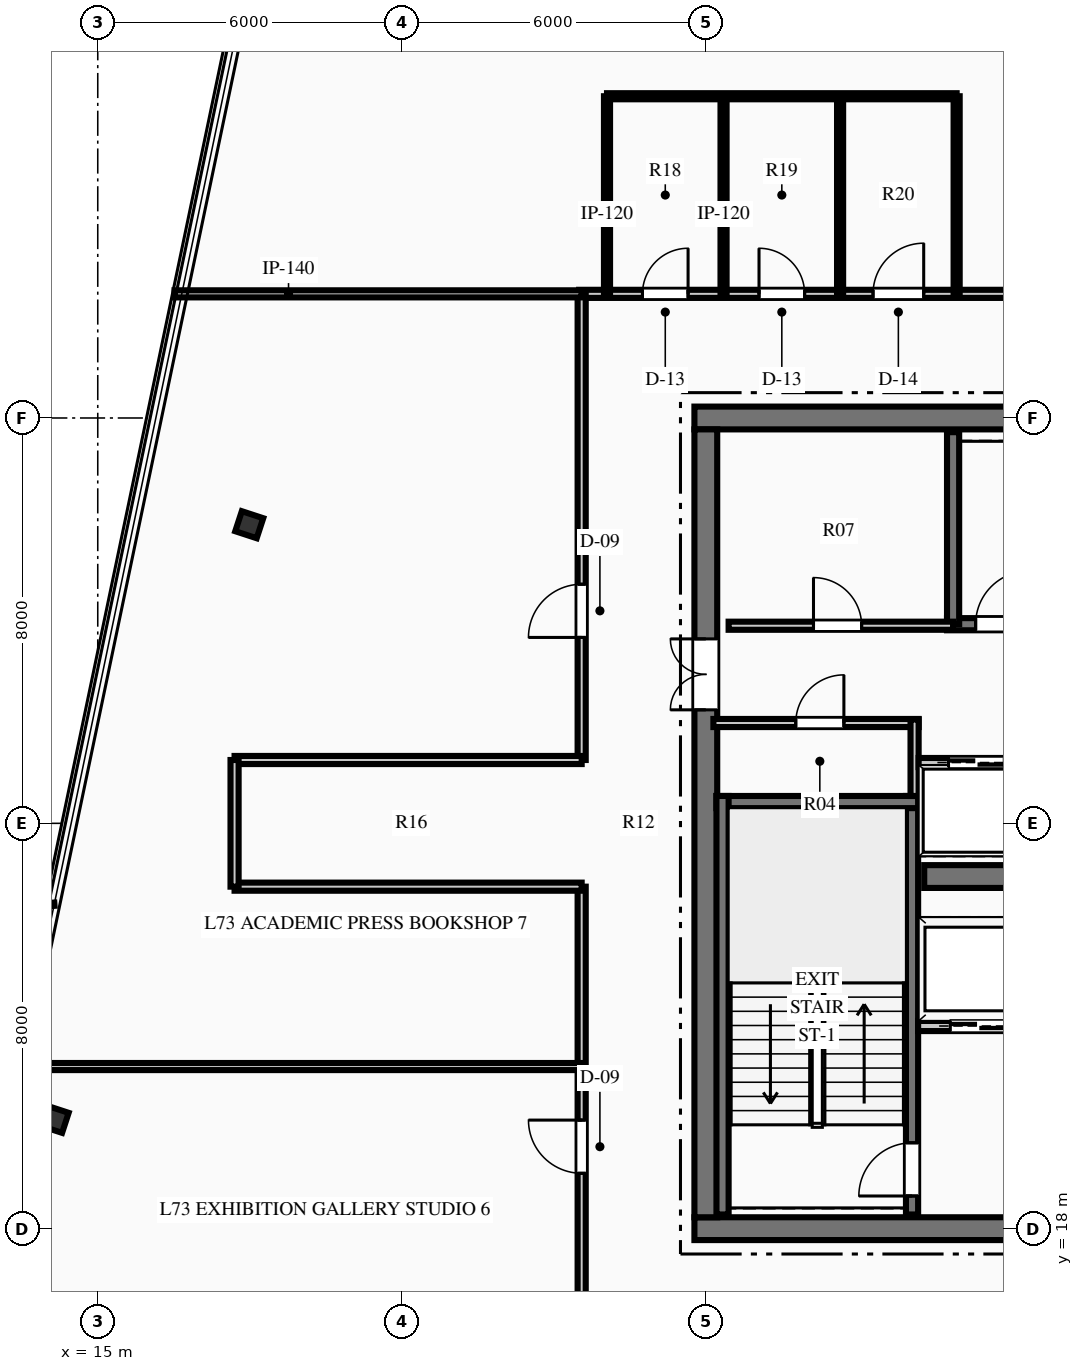
"""IFC4 building model, lengths in metres.
Left out: names, types, materials, properties, quantities, classifications, styles, units other than length and angle.
Written with IfcOpenShell. Run it as: python <this file> out.ifc"""

import sys

from ifc_helpers import new_model, si_unit, direction, frame, frame_2d, origin, origin_2d, place, context, subcontext, project, spatial, rectangle, i_section, extrude, element, fill, save


model = new_model("IFC4")
c1 = context("Model", 3, precision=1e-05, world=origin(), true_north=direction((0.0, 1.0)))
c2 = subcontext(c1, "Body", "Model", "MODEL_VIEW")
j1 = project(units=[si_unit("LENGTHUNIT", "METRE"), si_unit("PLANEANGLEUNIT", "RADIAN")], contexts=[c1])
p1 = place(None, origin())
s1 = spatial("IfcSite", under=j1, at=p1, CompositionType="ELEMENT")
p2 = place(p1, origin())
s2 = spatial("IfcBuilding", under=s1, at=p2, CompositionType="ELEMENT")
p3 = place(p2, frame((0.0, 0.0, 289.95)))
s3 = spatial("IfcBuildingStorey", under=s2, at=p3, CompositionType="ELEMENT", Elevation=289.95)
p4 = place(p3, frame((26.775, 18.0, 0.0), z_axis=(0.0, 0.0, 1.0), x_axis=(1.0, 0.0, 0.0)))
e1 = element("IfcWall", 1, at=p4, inside=s3, PredefinedType="SHEAR", context=c2, shape_type="SweptSolid", body=[
    extrude(rectangle(XDim=18.45, YDim=0.45, at=frame_2d((9.225, 0.0))), origin(), (0.0, 0.0, 1.0), 3.75),
])
p5 = place(p4, frame((7.325, 0.0, 0.0)))
e2 = element("IfcOpeningElement", 2, at=p5, cuts=e1, PredefinedType="OPENING", context=c2, shape_type="SweptSolid", body=[
    extrude(rectangle(XDim=1.1, YDim=2.15, at=frame_2d((0.55, 1.075))), frame((0.0, 0.235, 0.0), z_axis=(0.0, -1.0, 0.0), x_axis=(1.0, 0.0, 0.0)), (0.0, 0.0, 1.0), 0.47),
])
p6 = place(p4, frame((10.025, 0.0, 0.0)))
e3 = element("IfcOpeningElement", 3, at=p6, cuts=e1, PredefinedType="OPENING", context=c2, shape_type="SweptSolid", body=[
    extrude(rectangle(XDim=1.1, YDim=2.15, at=frame_2d((0.55, 1.075))), frame((0.0, 0.235, 0.0), z_axis=(0.0, -1.0, 0.0), x_axis=(1.0, 0.0, 0.0)), (0.0, 0.0, 1.0), 0.47),
])
p7 = place(p3, frame((26.775, 34.0, 0.0), z_axis=(0.0, 0.0, 1.0), x_axis=(1.0, 0.0, 0.0)))
e4 = element("IfcWall", 4, at=p7, inside=s3, PredefinedType="SHEAR", context=c2, shape_type="SweptSolid", body=[
    extrude(rectangle(XDim=18.45, YDim=0.45, at=frame_2d((9.225, 0.0))), origin(), (0.0, 0.0, 1.0), 3.75),
])
p8 = place(p3, frame((27.0, 18.225, 0.0), z_axis=(0.0, 0.0, 1.0), x_axis=(0.0, 1.0, 0.0)))
e5 = element("IfcWall", 5, at=p8, inside=s3, PredefinedType="SHEAR", context=c2, shape_type="SweptSolid", body=[
    extrude(rectangle(XDim=15.55, YDim=0.45, at=frame_2d((7.775, 0.0))), origin(), (0.0, 0.0, 1.0), 3.75),
])
p9 = place(p8, frame((10.015, 0.0, 0.0)))
e6 = element("IfcOpeningElement", 6, at=p9, cuts=e5, PredefinedType="OPENING", context=c2, shape_type="SweptSolid", body=[
    extrude(rectangle(XDim=1.4, YDim=2.2, at=frame_2d((0.7, 1.1))), frame((0.0, 0.235, 0.0), z_axis=(0.0, -1.0, 0.0), x_axis=(1.0, 0.0, 0.0)), (0.0, 0.0, 1.0), 0.47),
])
p10 = place(p3, frame((31.31, 24.95, 0.0), z_axis=(0.0, 0.0, 1.0), x_axis=(1.0, 0.0, 0.0)))
e7 = element("IfcWall", 7, at=p10, inside=s3, PredefinedType="SHEAR", context=c2, shape_type="SweptSolid", body=[
    extrude(rectangle(XDim=9.38, YDim=0.45, at=frame_2d((4.69, 0.0))), origin(), (0.0, 0.0, 1.0), 3.75),
])
p11 = place(p3, frame((31.07, 18.28, 0.0), z_axis=(0.0, 0.0, 1.0), x_axis=(0.0, 1.0, 0.0)))
e8 = element("IfcWall", 8, at=p11, inside=s3, PredefinedType="SHEAR", context=c2, shape_type="SweptSolid", body=[
    extrude(rectangle(XDim=8.26, YDim=0.24, at=frame_2d((4.13, 0.0))), origin(), (0.0, 0.0, 1.0), 3.75),
])
p12 = place(p11, frame((0.365, 0.0, 0.0)))
e9 = element("IfcOpeningElement", 9, at=p12, cuts=e8, PredefinedType="OPENING", context=c2, shape_type="SweptSolid", body=[
    extrude(rectangle(XDim=1.05, YDim=2.15, at=frame_2d((0.525, 1.075))), frame((0.0, 0.13, 0.0), z_axis=(0.0, -1.0, 0.0), x_axis=(1.0, 0.0, 0.0)), (0.0, 0.0, 1.0), 0.26),
])
p13 = place(p3, frame((27.21, 26.42, 0.0), z_axis=(0.0, 0.0, 1.0), x_axis=(1.0, 0.0, 0.0)))
e10 = element("IfcWall", 10, at=p13, inside=s3, PredefinedType="SHEAR", context=c2, shape_type="SweptSolid", body=[
    extrude(rectangle(XDim=3.98, YDim=0.24, at=frame_2d((1.99, 0.0))), origin(), (0.0, 0.0, 1.0), 3.75),
])
p14 = place(p3, frame((27.33, 18.28, 0.0), z_axis=(0.0, 0.0, 1.0), x_axis=(0.0, 1.0, 0.0)))
e11 = element("IfcWall", 11, at=p14, inside=s3, PredefinedType="SHEAR", context=c2, shape_type="SweptSolid", body=[
    extrude(rectangle(XDim=8.26, YDim=0.24, at=frame_2d((4.13, 0.0))), origin(), (0.0, 0.0, 1.0), 3.75),
])
p15 = place(p3, frame((31.76, 29.93, 0.0), z_axis=(0.0, 0.0, 1.0), x_axis=(1.0, 0.0, 0.0)))
e12 = element("IfcWall", 12, at=p15, inside=s3, PredefinedType="SHEAR", context=c2, shape_type="SweptSolid", body=[
    extrude(rectangle(XDim=8.38, YDim=0.24, at=frame_2d((4.19, 0.0))), origin(), (0.0, 0.0, 1.0), 3.75),
])
p16 = place(p15, frame((0.565, 0.0, 0.0)))
e13 = element("IfcOpeningElement", 13, at=p16, cuts=e12, PredefinedType="OPENING", context=c2, shape_type="SweptSolid", body=[
    extrude(rectangle(XDim=1.05, YDim=2.15, at=frame_2d((0.525, 1.075))), frame((0.0, 0.13, 0.0), z_axis=(0.0, -1.0, 0.0), x_axis=(1.0, 0.0, 0.0)), (0.0, 0.0, 1.0), 0.26),
])
p17 = place(p3, frame((31.88, 29.93, 0.0), z_axis=(0.0, 0.0, 1.0), x_axis=(0.0, 1.0, 0.0)))
e14 = element("IfcWall", 14, at=p17, inside=s3, PredefinedType="SHEAR", context=c2, shape_type="SweptSolid", body=[
    extrude(rectangle(XDim=3.79, YDim=0.24, at=frame_2d((1.895, 0.0))), origin(), (0.0, 0.0, 1.0), 3.75),
])
for number, where, z_axis, x_axis in (
    (15, (17.99, 31.894, 0.0), (0.0, 0.0, 1.0), (0.311, 0.95, 0.0)),
    (16, (14.149, 20.158, 0.0), (0.0, 0.0, 1.0), (0.311, 0.95, 0.0)),
):
    element("IfcColumn", number, at=place(p3, frame(where, z_axis=z_axis, x_axis=x_axis)), inside=s3, PredefinedType="COLUMN", context=c2, shape_type="SweptSolid", body=[
        extrude(i_section(OverallWidth=0.416, OverallDepth=0.445, WebThickness=0.039, FlangeThickness=0.063, at=origin_2d()), origin(), (0.0, 0.0, 1.0), 3.75),
    ])
p18 = place(p3, frame((31.19, 22.0, 0.0), z_axis=(0.0, 0.0, 1.0), x_axis=(1.0, 0.0, 0.0)))
e17 = element("IfcWall", 17, at=p18, inside=s3, PredefinedType="PARTITIONING", context=c2, shape_type="SweptSolid", body=[
    extrude(rectangle(XDim=4.69, YDim=0.2, at=frame_2d((2.345, 0.0))), origin(), (0.0, 0.0, 1.0), 3.34),
])
p19 = place(p18, frame((2.91, 0.0, 0.0)))
e18 = element("IfcOpeningElement", 18, at=p19, cuts=e17, PredefinedType="OPENING", context=c2, shape_type="SweptSolid", body=[
    extrude(rectangle(XDim=0.9, YDim=2.15, at=frame_2d((0.45, 1.075))), frame((0.0, 0.11, 0.0), z_axis=(0.0, -1.0, 0.0), x_axis=(1.0, 0.0, 0.0)), (0.0, 0.0, 1.0), 0.22),
])
p20 = place(p18, frame((0.635, 0.0, 0.0)))
e19 = element("IfcOpeningElement", 19, at=p20, cuts=e17, PredefinedType="OPENING", context=c2, shape_type="SweptSolid", body=[
    extrude(rectangle(XDim=1.1, YDim=2.15, at=frame_2d((0.55, 1.075))), frame((0.0, 0.11, 0.0), z_axis=(0.0, -1.0, 0.0), x_axis=(1.0, 0.0, 0.0)), (0.0, 0.0, 1.0), 0.22),
])
p21 = place(p3, frame((27.15, 27.98, 0.0), z_axis=(0.0, 0.0, 1.0), x_axis=(1.0, 0.0, 0.0)))
e20 = element("IfcWall", 20, at=p21, inside=s3, PredefinedType="PARTITIONING", context=c2, shape_type="SweptSolid", body=[
    extrude(rectangle(XDim=4.05, YDim=0.16, at=frame_2d((2.025, 0.0))), origin(), (0.0, 0.0, 1.0), 3.34),
])
p22 = place(p21, frame((1.625, 0.0, 0.0)))
e21 = element("IfcOpeningElement", 21, at=p22, cuts=e20, PredefinedType="OPENING", context=c2, shape_type="SweptSolid", body=[
    extrude(rectangle(XDim=0.95, YDim=2.15, at=frame_2d((0.475, 1.075))), frame((0.0, 0.09, 0.0), z_axis=(0.0, -1.0, 0.0), x_axis=(1.0, 0.0, 0.0)), (0.0, 0.0, 1.0), 0.18),
])
p23 = place(p3, frame((31.12, 26.54, 0.0), z_axis=(0.0, 0.0, 1.0), x_axis=(0.0, 1.0, 0.0)))
e22 = element("IfcWall", 22, at=p23, inside=s3, PredefinedType="PARTITIONING", context=c2, shape_type="SweptSolid", body=[
    extrude(rectangle(XDim=1.51, YDim=0.16, at=frame_2d((0.755, 0.0))), origin(), (0.0, 0.0, 1.0), 3.34),
])
p24 = place(p3, frame((27.45, 29.9, 0.0), z_axis=(0.0, 0.0, 1.0), x_axis=(1.0, 0.0, 0.0)))
e23 = element("IfcWall", 23, at=p24, inside=s3, PredefinedType="PARTITIONING", context=c2, shape_type="SweptSolid", body=[
    extrude(rectangle(XDim=4.43, YDim=0.16, at=frame_2d((2.215, 0.0))), origin(), (0.0, 0.0, 1.0), 3.34),
])
p25 = place(p24, frame((1.675, 0.0, 0.0)))
e24 = element("IfcOpeningElement", 24, at=p25, cuts=e23, PredefinedType="OPENING", context=c2, shape_type="SweptSolid", body=[
    extrude(rectangle(XDim=0.95, YDim=2.15, at=frame_2d((0.475, 1.075))), frame((0.0, 0.09, 0.0), z_axis=(0.0, -1.0, 0.0), x_axis=(1.0, 0.0, 0.0)), (0.0, 0.0, 1.0), 0.18),
])
p26 = place(p3, frame((31.2, 27.2, 0.0), z_axis=(0.0, 0.0, 1.0), x_axis=(1.0, 0.0, 0.0)))
e25 = element("IfcWall", 25, at=p26, inside=s3, PredefinedType="PARTITIONING", context=c2, shape_type="SweptSolid", body=[
    extrude(rectangle(XDim=9.6, YDim=0.18, at=frame_2d((4.8, 0.0))), origin(), (0.0, 0.0, 1.0), 3.34),
])
p27 = place(p26, frame((0.59, 0.0, 0.0)))
e26 = element("IfcOpeningElement", 26, at=p27, cuts=e25, PredefinedType="OPENING", context=c2, shape_type="SweptSolid", body=[
    extrude(rectangle(XDim=1.1, YDim=2.15, at=frame_2d((0.55, 1.075))), frame((0.0, 0.1, 0.0), z_axis=(0.0, -1.0, 0.0), x_axis=(1.0, 0.0, 0.0)), (0.0, 0.0, 1.0), 0.2),
])
p28 = place(p26, frame((2.99, 0.0, 0.0)))
e27 = element("IfcOpeningElement", 27, at=p28, cuts=e25, PredefinedType="OPENING", context=c2, shape_type="SweptSolid", body=[
    extrude(rectangle(XDim=1.1, YDim=2.15, at=frame_2d((0.55, 1.075))), frame((0.0, 0.1, 0.0), z_axis=(0.0, -1.0, 0.0), x_axis=(1.0, 0.0, 0.0)), (0.0, 0.0, 1.0), 0.2),
])
p29 = place(p26, frame((5.51, 0.0, 0.0)))
e28 = element("IfcOpeningElement", 28, at=p29, cuts=e25, PredefinedType="OPENING", context=c2, shape_type="SweptSolid", body=[
    extrude(rectangle(XDim=1.1, YDim=2.15, at=frame_2d((0.55, 1.075))), frame((0.0, 0.1, 0.0), z_axis=(0.0, -1.0, 0.0), x_axis=(1.0, 0.0, 0.0)), (0.0, 0.0, 1.0), 0.2),
])
p30 = place(p26, frame((7.91, 0.0, 0.0)))
e29 = element("IfcOpeningElement", 29, at=p30, cuts=e25, PredefinedType="OPENING", context=c2, shape_type="SweptSolid", body=[
    extrude(rectangle(XDim=1.1, YDim=2.15, at=frame_2d((0.55, 1.075))), frame((0.0, 0.1, 0.0), z_axis=(0.0, -1.0, 0.0), x_axis=(1.0, 0.0, 0.0)), (0.0, 0.0, 1.0), 0.2),
])
p31 = place(p3, frame((24.5, 36.45, 0.0), z_axis=(0.0, 0.0, 1.0), x_axis=(1.0, 0.0, 0.0)))
e30 = element("IfcWall", 30, at=p31, inside=s3, PredefinedType="PARTITIONING", context=c2, shape_type="SweptSolid", body=[
    extrude(rectangle(XDim=10.25, YDim=0.16, at=frame_2d((5.125, 0.0))), origin(), (0.0, 0.0, 1.0), 3.34),
])
p32 = place(p31, frame((1.25, 0.0, 0.0)))
e31 = element("IfcOpeningElement", 31, at=p32, cuts=e30, PredefinedType="OPENING", context=c2, shape_type="SweptSolid", body=[
    extrude(rectangle(XDim=0.9, YDim=2.15, at=frame_2d((0.45, 1.075))), frame((0.0, 0.09, 0.0), z_axis=(0.0, -1.0, 0.0), x_axis=(1.0, 0.0, 0.0)), (0.0, 0.0, 1.0), 0.18),
])
p33 = place(p31, frame((3.55, 0.0, 0.0)))
e32 = element("IfcOpeningElement", 32, at=p33, cuts=e30, PredefinedType="OPENING", context=c2, shape_type="SweptSolid", body=[
    extrude(rectangle(XDim=0.9, YDim=2.15, at=frame_2d((0.45, 1.075))), frame((0.0, 0.09, 0.0), z_axis=(0.0, -1.0, 0.0), x_axis=(1.0, 0.0, 0.0)), (0.0, 0.0, 1.0), 0.18),
])
p34 = place(p31, frame((5.8, 0.0, 0.0)))
e33 = element("IfcOpeningElement", 33, at=p34, cuts=e30, PredefinedType="OPENING", context=c2, shape_type="SweptSolid", body=[
    extrude(rectangle(XDim=1.0, YDim=2.15, at=frame_2d((0.5, 1.075))), frame((0.0, 0.09, 0.0), z_axis=(0.0, -1.0, 0.0), x_axis=(1.0, 0.0, 0.0)), (0.0, 0.0, 1.0), 0.18),
])
p35 = place(p3, frame((24.55, 15.55, 0.0), z_axis=(0.0, 0.0, 1.0), x_axis=(0.0, 1.0, 0.0)))
e34 = element("IfcWall", 34, at=p35, inside=s3, PredefinedType="PARTITIONING", context=c2, shape_type="SweptSolid", body=[
    extrude(rectangle(XDim=9.2, YDim=0.16, at=frame_2d((4.6, 0.0))), origin(), (0.0, 0.0, 1.0), 3.34),
])
p36 = place(p35, frame((3.543, 0.0, 0.0)))
e35 = element("IfcOpeningElement", 35, at=p36, cuts=e34, PredefinedType="OPENING", context=c2, shape_type="SweptSolid", body=[
    extrude(rectangle(XDim=1.05, YDim=2.15, at=frame_2d((0.525, 1.075))), frame((0.0, 0.09, 0.0), z_axis=(0.0, -1.0, 0.0), x_axis=(1.0, 0.0, 0.0)), (0.0, 0.0, 1.0), 0.18),
])
p37 = place(p3, frame((24.55, 27.25, 0.0), z_axis=(0.0, 0.0, 1.0), x_axis=(0.0, 1.0, 0.0)))
e36 = element("IfcWall", 36, at=p37, inside=s3, PredefinedType="PARTITIONING", context=c2, shape_type="SweptSolid", body=[
    extrude(rectangle(XDim=9.2, YDim=0.16, at=frame_2d((4.6, 0.0))), origin(), (0.0, 0.0, 1.0), 3.34),
])
p38 = place(p37, frame((2.419, 0.0, 0.0)))
e37 = element("IfcOpeningElement", 37, at=p38, cuts=e36, PredefinedType="OPENING", context=c2, shape_type="SweptSolid", body=[
    extrude(rectangle(XDim=1.05, YDim=2.15, at=frame_2d((0.525, 1.075))), frame((0.0, 0.09, 0.0), z_axis=(0.0, -1.0, 0.0), x_axis=(1.0, 0.0, 0.0)), (0.0, 0.0, 1.0), 0.18),
])
for number, where, z_axis, x_axis in (
    (38, (17.7, 24.75, 0.0), (0.0, 0.0, 1.0), (1.0, 0.0, 0.0)),
    (39, (17.7, 27.25, 0.0), (0.0, 0.0, 1.0), (1.0, 0.0, 0.0)),
):
    element("IfcWall", number, at=place(p3, frame(where, z_axis=z_axis, x_axis=x_axis)), inside=s3, PredefinedType="PARTITIONING", context=c2, shape_type="SweptSolid", body=[
        extrude(rectangle(XDim=6.85, YDim=0.16, at=frame_2d((3.425, 0.0))), origin(), (0.0, 0.0, 1.0), 3.34),
    ])
p39 = place(p3, frame((17.7, 24.75, 0.0), z_axis=(0.0, 0.0, 1.0), x_axis=(0.0, 1.0, 0.0)))
e40 = element("IfcWall", 40, at=p39, inside=s3, PredefinedType="PARTITIONING", context=c2, shape_type="SweptSolid", body=[
    extrude(rectangle(XDim=2.5, YDim=0.16, at=frame_2d((1.25, 0.0))), origin(), (0.0, 0.0, 1.0), 3.34),
])
for number, where, z_axis, x_axis in (
    (41, (25.05, 36.45, 0.0), (0.0, 0.0, 1.0), (0.0, 1.0, 0.0)),
    (42, (27.35, 36.45, 0.0), (0.0, 0.0, 1.0), (0.0, 1.0, 0.0)),
    (43, (29.65, 36.45, 0.0), (0.0, 0.0, 1.0), (0.0, 1.0, 0.0)),
):
    element("IfcWall", number, at=place(p3, frame(where, z_axis=z_axis, x_axis=x_axis)), inside=s3, PredefinedType="PARTITIONING", context=c2, shape_type="SweptSolid", body=[
        extrude(rectangle(XDim=3.9, YDim=0.12, at=frame_2d((1.95, 0.0))), origin(), (0.0, 0.0, 1.0), 3.34),
    ])
p40 = place(p3, frame((31.95, 36.45, 0.0), z_axis=(0.0, 0.0, 1.0), x_axis=(0.0, 1.0, 0.0)))
e44 = element("IfcWall", 44, at=p40, inside=s3, PredefinedType="PARTITIONING", context=c2, shape_type="SweptSolid", body=[
    extrude(rectangle(XDim=3.9, YDim=0.12, at=frame_2d((1.95, 0.0))), origin(), (0.0, 0.0, 1.0), 2.718),
])
p41 = place(p3, frame((25.05, 40.35, 0.0), z_axis=(0.0, 0.0, 1.0), x_axis=(1.0, 0.0, 0.0)))
e45 = element("IfcWall", 45, at=p41, inside=s3, PredefinedType="PARTITIONING", context=c2, shape_type="SweptSolid", body=[
    extrude(rectangle(XDim=6.9, YDim=0.12, at=frame_2d((3.45, 0.0))), origin(), (0.0, 0.0, 1.0), 3.34),
])
p42 = place(p3, frame((16.515, 36.45, 0.0), z_axis=(0.0, 0.0, 1.0), x_axis=(1.0, 0.0, 0.0)))
e46 = element("IfcWall", 46, at=p42, inside=s3, PredefinedType="PARTITIONING", context=c2, shape_type="SweptSolid", body=[
    extrude(rectangle(XDim=8.035, YDim=0.14, at=frame_2d((4.018, 0.0))), origin(), (0.0, 0.0, 1.0), 3.34),
])
p43 = place(p3, frame((13.329, 21.2, 0.0), z_axis=(0.0, 0.0, 1.0), x_axis=(1.0, 0.0, 0.0)))
e47 = element("IfcWall", 47, at=p43, inside=s3, PredefinedType="PARTITIONING", context=c2, shape_type="SweptSolid", body=[
    extrude(rectangle(XDim=11.221, YDim=0.14, at=frame_2d((5.61, 0.0))), origin(), (0.0, 0.0, 1.0), 3.34),
])
p44 = place(p22, origin())
e48 = element("IfcDoor", 48, at=p44, inside=s3, OperationType="SINGLE_SWING_RIGHT", PredefinedType="DOOR", context=c2, shape_type="SweptSolid", body=[
    extrude(rectangle(XDim=0.95, YDim=2.15, at=frame_2d((0.475, 1.075))), frame((0.0, 0.025, 0.0), z_axis=(0.0, -1.0, 0.0), x_axis=(1.0, 0.0, 0.0)), (0.0, 0.0, 1.0), 0.05),
])
fill(e21, e48)
p45 = place(p25, origin())
e49 = element("IfcDoor", 49, at=p45, inside=s3, OperationType="SINGLE_SWING_LEFT", PredefinedType="DOOR", context=c2, shape_type="SweptSolid", body=[
    extrude(rectangle(XDim=0.95, YDim=2.15, at=frame_2d((0.475, 1.075))), frame((0.0, 0.025, 0.0), z_axis=(0.0, -1.0, 0.0), x_axis=(1.0, 0.0, 0.0)), (0.0, 0.0, 1.0), 0.05),
])
fill(e24, e49)
p46 = place(p12, origin())
e50 = element("IfcDoor", 50, at=p46, inside=s3, OperationType="SINGLE_SWING_LEFT", PredefinedType="DOOR", context=c2, shape_type="SweptSolid", body=[
    extrude(rectangle(XDim=1.05, YDim=2.15, at=frame_2d((0.525, 1.075))), frame((0.0, 0.025, 0.0), z_axis=(0.0, -1.0, 0.0), x_axis=(1.0, 0.0, 0.0)), (0.0, 0.0, 1.0), 0.05),
])
fill(e9, e50)
p47 = place(p16, origin())
e51 = element("IfcDoor", 51, at=p47, inside=s3, OperationType="SINGLE_SWING_RIGHT", PredefinedType="DOOR", context=c2, shape_type="SweptSolid", body=[
    extrude(rectangle(XDim=1.05, YDim=2.15, at=frame_2d((0.525, 1.075))), frame((0.0, 0.025, 0.0), z_axis=(0.0, -1.0, 0.0), x_axis=(1.0, 0.0, 0.0)), (0.0, 0.0, 1.0), 0.05),
])
fill(e13, e51)
p48 = place(p9, origin())
e52 = element("IfcDoor", 52, at=p48, inside=s3, OperationType="DOUBLE_DOOR_SINGLE_SWING", PredefinedType="DOOR", context=c2, shape_type="SweptSolid", body=[
    extrude(rectangle(XDim=1.4, YDim=2.2, at=frame_2d((0.7, 1.1))), frame((0.0, 0.025, 0.0), z_axis=(0.0, -1.0, 0.0), x_axis=(1.0, 0.0, 0.0)), (0.0, 0.0, 1.0), 0.05),
])
fill(e6, e52)
p49 = place(p32, origin())
e53 = element("IfcDoor", 53, at=p49, inside=s3, OperationType="SINGLE_SWING_RIGHT", PredefinedType="DOOR", context=c2, shape_type="SweptSolid", body=[
    extrude(rectangle(XDim=0.9, YDim=2.15, at=frame_2d((0.45, 1.075))), frame((0.0, 0.025, 0.0), z_axis=(0.0, -1.0, 0.0), x_axis=(1.0, 0.0, 0.0)), (0.0, 0.0, 1.0), 0.05),
])
fill(e31, e53)
p50 = place(p33, origin())
e54 = element("IfcDoor", 54, at=p50, inside=s3, OperationType="SINGLE_SWING_LEFT", PredefinedType="DOOR", context=c2, shape_type="SweptSolid", body=[
    extrude(rectangle(XDim=0.9, YDim=2.15, at=frame_2d((0.45, 1.075))), frame((0.0, 0.025, 0.0), z_axis=(0.0, -1.0, 0.0), x_axis=(1.0, 0.0, 0.0)), (0.0, 0.0, 1.0), 0.05),
])
fill(e32, e54)
p51 = place(p34, origin())
e55 = element("IfcDoor", 55, at=p51, inside=s3, OperationType="SINGLE_SWING_RIGHT", PredefinedType="DOOR", context=c2, shape_type="SweptSolid", body=[
    extrude(rectangle(XDim=1.0, YDim=2.15, at=frame_2d((0.5, 1.075))), frame((0.0, 0.025, 0.0), z_axis=(0.0, -1.0, 0.0), x_axis=(1.0, 0.0, 0.0)), (0.0, 0.0, 1.0), 0.05),
])
fill(e33, e55)
p52 = place(p36, origin())
e56 = element("IfcDoor", 56, at=p52, inside=s3, OperationType="SINGLE_SWING_RIGHT", PredefinedType="DOOR", context=c2, shape_type="SweptSolid", body=[
    extrude(rectangle(XDim=1.05, YDim=2.15, at=frame_2d((0.525, 1.075))), frame((0.0, 0.025, 0.0), z_axis=(0.0, -1.0, 0.0), x_axis=(1.0, 0.0, 0.0)), (0.0, 0.0, 1.0), 0.05),
])
fill(e35, e56)
p53 = place(p38, origin())
e57 = element("IfcDoor", 57, at=p53, inside=s3, OperationType="SINGLE_SWING_LEFT", PredefinedType="DOOR", context=c2, shape_type="SweptSolid", body=[
    extrude(rectangle(XDim=1.05, YDim=2.15, at=frame_2d((0.525, 1.075))), frame((0.0, 0.025, 0.0), z_axis=(0.0, -1.0, 0.0), x_axis=(1.0, 0.0, 0.0)), (0.0, 0.0, 1.0), 0.05),
])
fill(e37, e57)
p54 = place(p27, origin())
e58 = element("IfcDoor", 58, at=p54, inside=s3, OperationType="SLIDING_TO_LEFT", PredefinedType="DOOR", context=c2, shape_type="SweptSolid", body=[
    extrude(rectangle(XDim=1.1, YDim=2.15, at=frame_2d((0.55, 1.075))), frame((0.0, 0.025, 0.0), z_axis=(0.0, -1.0, 0.0), x_axis=(1.0, 0.0, 0.0)), (0.0, 0.0, 1.0), 0.05),
])
fill(e26, e58)
p55 = place(p20, origin())
e59 = element("IfcDoor", 59, at=p55, inside=s3, OperationType="SLIDING_TO_LEFT", PredefinedType="DOOR", context=c2, shape_type="SweptSolid", body=[
    extrude(rectangle(XDim=1.1, YDim=2.15, at=frame_2d((0.55, 1.075))), frame((0.0, 0.025, 0.0), z_axis=(0.0, -1.0, 0.0), x_axis=(1.0, 0.0, 0.0)), (0.0, 0.0, 1.0), 0.05),
])
fill(e19, e59)
save(model, sys.argv[1])
